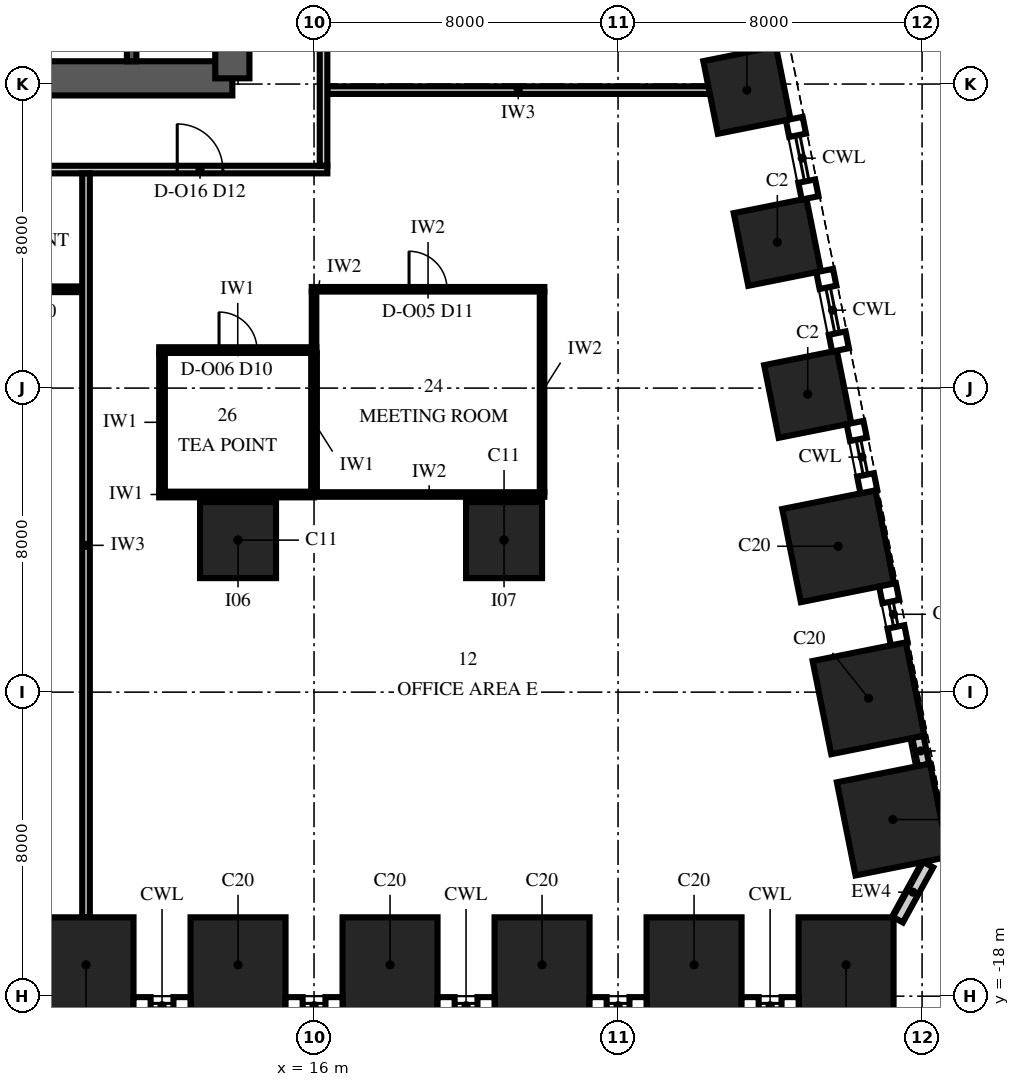
"""IFC4 building model, lengths in metres.
Left out: names, types, materials, properties, quantities, classifications, styles, units other than length and angle.
Written with IfcOpenShell. Run it as: python <this file> out.ifc"""

import sys

from ifc_helpers import new_model, si_unit, direction, frame, frame_2d, origin, origin_2d, place, context, subcontext, project, spatial, polyline, rectangle, outline, extrude, element, fill, save


model = new_model("IFC4")
c1 = context("Model", 3, precision=1e-05, world=origin(), true_north=direction((0.0, 1.0)))
c2 = subcontext(c1, "Body", "Model", "MODEL_VIEW")
j1 = project(units=[si_unit("LENGTHUNIT", "METRE"), si_unit("PLANEANGLEUNIT", "RADIAN")], contexts=[c1])
p1 = place(None, origin())
s1 = spatial("IfcSite", under=j1, at=p1, CompositionType="ELEMENT")
p2 = place(p1, origin())
s2 = spatial("IfcBuilding", under=s1, at=p2, CompositionType="ELEMENT")
p3 = place(p2, frame((0.0, 0.0, 36.0)))
s3 = spatial("IfcBuildingStorey", under=s2, at=p3, CompositionType="ELEMENT", Elevation=36.0)
for number, where, z_axis, x_axis in (
    (1, (10.0, -17.175, 0.0), (0.0, 0.0, 1.0), (1.0, 0.0, 0.0)),
    (2, (14.0, -17.175, 0.0), (0.0, 0.0, 1.0), (1.0, 0.0, 0.0)),
    (3, (18.0, -17.175, 0.0), (0.0, 0.0, 1.0), (1.0, 0.0, 0.0)),
    (4, (22.0, -17.175, 0.0), (0.0, 0.0, 1.0), (1.0, 0.0, 0.0)),
    (5, (26.0, -17.175, 0.0), (0.0, 0.0, 1.0), (1.0, 0.0, 0.0)),
    (6, (30.0, -17.175, 0.0), (0.0, 0.0, 1.0), (1.0, 0.0, 0.0)),
    (7, (31.229, -13.353, 0.0), (0.0, 0.0, 1.0), (-0.196, 0.981, 0.0)),
    (8, (30.591, -10.162, 0.0), (0.0, 0.0, 1.0), (-0.196, 0.981, 0.0)),
    (9, (29.791, -6.162, 0.0), (0.0, 0.0, 1.0), (-0.196, 0.981, 0.0)),
):
    element("IfcColumn", number, at=place(p3, frame(where, z_axis=z_axis, x_axis=x_axis)), inside=s3, PredefinedType="COLUMN", context=c2, shape_type="SweptSolid", body=[
        extrude(rectangle(XDim=2.5, YDim=2.5, at=origin_2d()), origin(), (0.0, 0.0, 1.0), 4.0),
    ])
for number, where, z_axis, x_axis in (
    (10, (28.991, -2.162, 0.0), (0.0, 0.0, 1.0), (-0.196, 0.981, 0.0)),
    (11, (28.191, 1.838, 0.0), (0.0, 0.0, 1.0), (-0.196, 0.981, 0.0)),
    (12, (27.391, 5.838, 0.0), (0.0, 0.0, 1.0), (-0.196, 0.981, 0.0)),
):
    element("IfcColumn", number, at=place(p3, frame(where, z_axis=z_axis, x_axis=x_axis)), inside=s3, PredefinedType="COLUMN", context=c2, shape_type="SweptSolid", body=[
        extrude(rectangle(XDim=1.95, YDim=1.95, at=origin_2d()), origin(), (0.0, 0.0, 1.0), 4.0),
    ])
for number, where, z_axis, x_axis in (
    (13, (14.0, -6.0, 0.0), (0.0, 0.0, 1.0), (1.0, 0.0, 0.0)),
    (14, (21.0, -6.0, 0.0), (0.0, 0.0, 1.0), (1.0, 0.0, 0.0)),
):
    element("IfcColumn", number, at=place(p3, frame(where, z_axis=z_axis, x_axis=x_axis)), inside=s3, PredefinedType="COLUMN", context=c2, shape_type="SweptSolid", body=[
        extrude(rectangle(XDim=2.0, YDim=2.0, at=origin_2d()), origin(), (0.0, 0.0, 1.0), 4.0),
    ])
p4 = place(p3, frame((-13.85, 6.15, 0.0), z_axis=(0.0, 0.0, 1.0), x_axis=(1.0, 0.0, 0.0)))
e15 = element("IfcWall", 15, at=p4, inside=s3, PredefinedType="SHEAR", context=c2, shape_type="SweptSolid", body=[
    extrude(rectangle(XDim=27.7, YDim=0.9, at=frame_2d((13.85, 0.0))), origin(), (0.0, 0.0, 1.0), 4.0),
])
p5 = place(p3, frame((13.85, 6.15, 0.0), z_axis=(0.0, 0.0, 1.0), x_axis=(0.0, 1.0, 0.0)))
e16 = element("IfcWall", 16, at=p5, inside=s3, PredefinedType="SHEAR", context=c2, shape_type="SweptSolid", body=[
    extrude(outline(polyline([(0.0, -0.45), (17.7, -0.45), (17.7, 0.0), (17.25, 0.0), (17.25, 0.45), (0.45, 0.45), (0.45, 0.0), (0.0, 0.0), (0.0, -0.45)])), origin(), (0.0, 0.0, 1.0), 4.0),
])
p6 = place(p5, frame((4.15, 0.0, 0.0)))
e17 = element("IfcOpeningElement", 17, at=p6, cuts=e16, PredefinedType="OPENING", context=c2, shape_type="SweptSolid", body=[
    extrude(rectangle(XDim=1.8, YDim=2.4, at=frame_2d((0.9, 1.2))), frame((0.0, 0.465, 0.0), z_axis=(0.0, -1.0, 0.0), x_axis=(1.0, 0.0, 0.0)), (0.0, 0.0, 1.0), 0.93),
])
p7 = place(p3, frame((11.2, 6.6, 0.0), z_axis=(0.0, 0.0, 1.0), x_axis=(0.0, 1.0, 0.0)))
e18 = element("IfcWall", 18, at=p7, inside=s3, PredefinedType="SHEAR", context=c2, shape_type="SweptSolid", body=[
    extrude(rectangle(XDim=2.675, YDim=0.25, at=frame_2d((1.337, 0.0))), origin(), (0.0, 0.0, 1.0), 4.0),
])
p8 = place(p3, frame((31.363, -15.988, 0.0), z_axis=(0.0, 0.0, 1.0), x_axis=(0.481879089964, 0.876237720402, 0.0)))
e19 = element("IfcWall", 19, at=p8, inside=s3, PredefinedType="SOLIDWALL", context=c2, shape_type="SweptSolid", body=[
    extrude(rectangle(XDim=1.654, YDim=0.3, at=frame_2d((0.827, 0.0))), origin(), (0.0, 0.0, 1.0), 4.0),
])
p9 = place(p3, frame((32.038, -11.916, 0.0), z_axis=(0.0, 0.0, 1.0), x_axis=(-0.195867092459, 0.980630451338, 0.0)))
e20 = element("IfcWall", 20, at=p9, inside=s3, PredefinedType="SOLIDWALL", context=c2, shape_type="SweptSolid", body=[
    extrude(rectangle(XDim=0.754, YDim=0.3, at=frame_2d((0.377, 0.0))), origin(), (0.0, 0.0, 1.0), 4.0),
])
p10 = place(p3, frame((11.925, -4.8, 0.0), z_axis=(0.0, 0.0, 1.0), x_axis=(1.0, 0.0, 0.0)))
e21 = element("IfcWall", 21, at=p10, inside=s3, PredefinedType="PARTITIONING", context=c2, shape_type="SweptSolid", body=[
    extrude(rectangle(XDim=4.075, YDim=0.15, at=frame_2d((2.038, 0.0))), origin(), (0.0, 0.0, 1.0), 3.25),
])
p11 = place(p3, frame((16.0, -4.8, 0.0), z_axis=(0.0, 0.0, 1.0), x_axis=(1.0, 0.0, 0.0)))
e22 = element("IfcWall", 22, at=p11, inside=s3, PredefinedType="PARTITIONING", context=c2, shape_type="SweptSolid", body=[
    extrude(rectangle(XDim=6.06, YDim=0.12, at=frame_2d((3.03, 0.0))), origin(), (0.0, 0.0, 1.0), 3.25),
])
p12 = place(p3, frame((11.925, -1.0, 0.0), z_axis=(0.0, 0.0, 1.0), x_axis=(1.0, 0.0, 0.0)))
e23 = element("IfcWall", 23, at=p12, inside=s3, PredefinedType="PARTITIONING", context=c2, shape_type="SweptSolid", body=[
    extrude(rectangle(XDim=4.135, YDim=0.15, at=frame_2d((2.067, 0.0))), origin(), (0.0, 0.0, 1.0), 3.25),
])
p13 = place(p12, frame((1.575, 0.0, 0.0)))
e24 = element("IfcOpeningElement", 24, at=p13, cuts=e23, PredefinedType="OPENING", context=c2, shape_type="SweptSolid", body=[
    extrude(rectangle(XDim=1.0, YDim=2.3, at=frame_2d((0.5, 1.15))), frame((0.0, 0.09, 0.0), z_axis=(0.0, -1.0, 0.0), x_axis=(1.0, 0.0, 0.0)), (0.0, 0.0, 1.0), 0.18),
])
p14 = place(p3, frame((5.925, 0.6, 0.0), z_axis=(0.0, 0.0, 1.0), x_axis=(1.0, 0.0, 0.0)))
e25 = element("IfcWall", 25, at=p14, inside=s3, PredefinedType="PARTITIONING", context=c2, shape_type="SweptSolid", body=[
    extrude(rectangle(XDim=3.975, YDim=0.15, at=frame_2d((1.987, 0.0))), origin(), (0.0, 0.0, 1.0), 3.85),
])
p15 = place(p14, frame((1.575, 0.0, 0.0)))
e26 = element("IfcOpeningElement", 26, at=p15, cuts=e25, PredefinedType="OPENING", context=c2, shape_type="SweptSolid", body=[
    extrude(rectangle(XDim=1.0, YDim=2.3, at=frame_2d((0.5, 1.15))), frame((0.0, 0.09, 0.0), z_axis=(0.0, -1.0, 0.0), x_axis=(1.0, 0.0, 0.0)), (0.0, 0.0, 1.0), 0.18),
])
p16 = place(p3, frame((15.94, 0.6, 0.0), z_axis=(0.0, 0.0, 1.0), x_axis=(1.0, 0.0, 0.0)))
e27 = element("IfcWall", 27, at=p16, inside=s3, PredefinedType="PARTITIONING", context=c2, shape_type="SweptSolid", body=[
    extrude(rectangle(XDim=6.12, YDim=0.12, at=frame_2d((3.06, 0.0))), origin(), (0.0, 0.0, 1.0), 3.25),
])
p17 = place(p16, frame((2.56, 0.0, 0.0)))
e28 = element("IfcOpeningElement", 28, at=p17, cuts=e27, PredefinedType="OPENING", context=c2, shape_type="SweptSolid", body=[
    extrude(rectangle(XDim=1.0, YDim=2.4, at=frame_2d((0.5, 1.2))), frame((0.0, 0.075, 0.0), z_axis=(0.0, -1.0, 0.0), x_axis=(1.0, 0.0, 0.0)), (0.0, 0.0, 1.0), 0.15),
])
p18 = place(p3, frame((-16.35, 3.75, 0.0), z_axis=(0.0, 0.0, 1.0), x_axis=(1.0, 0.0, 0.0)))
e29 = element("IfcWall", 29, at=p18, inside=s3, PredefinedType="PARTITIONING", context=c2, shape_type="SweptSolid", body=[
    extrude(rectangle(XDim=32.7, YDim=0.2, at=frame_2d((16.35, 0.0))), origin(), (0.0, 0.0, 1.0), 3.25),
])
p19 = place(p18, frame((15.75, 0.0, 0.0)))
e30 = element("IfcOpeningElement", 30, at=p19, cuts=e29, PredefinedType="OPENING", context=c2, shape_type="SweptSolid", body=[
    extrude(rectangle(XDim=1.2, YDim=2.4, at=frame_2d((0.6, 1.2))), frame((0.0, 0.115, 0.0), z_axis=(0.0, -1.0, 0.0), x_axis=(1.0, 0.0, 0.0)), (0.0, 0.0, 1.0), 0.23),
])
p20 = place(p18, frame((2.75, 0.0, 0.0)))
e31 = element("IfcOpeningElement", 31, at=p20, cuts=e29, PredefinedType="OPENING", context=c2, shape_type="SweptSolid", body=[
    extrude(rectangle(XDim=1.2, YDim=2.4, at=frame_2d((0.6, 1.2))), frame((0.0, 0.115, 0.0), z_axis=(0.0, -1.0, 0.0), x_axis=(1.0, 0.0, 0.0)), (0.0, 0.0, 1.0), 0.23),
])
p21 = place(p18, frame((28.75, 0.0, 0.0)))
e32 = element("IfcOpeningElement", 32, at=p21, cuts=e29, PredefinedType="OPENING", context=c2, shape_type="SweptSolid", body=[
    extrude(rectangle(XDim=1.2, YDim=2.4, at=frame_2d((0.6, 1.2))), frame((0.0, 0.115, 0.0), z_axis=(0.0, -1.0, 0.0), x_axis=(1.0, 0.0, 0.0)), (0.0, 0.0, 1.0), 0.23),
])
p22 = place(p3, frame((16.35, 5.84, 0.0), z_axis=(0.0, 0.0, 1.0), x_axis=(1.0, 0.0, 0.0)))
e33 = element("IfcWall", 33, at=p22, inside=s3, PredefinedType="PARTITIONING", context=c2, shape_type="SweptSolid", body=[
    extrude(rectangle(XDim=10.046, YDim=0.2, at=frame_2d((5.023, 0.0))), origin(), (0.0, 0.0, 1.0), 2.842),
])
p23 = place(p3, frame((10.0, -15.925, 0.0), z_axis=(0.0, 0.0, 1.0), x_axis=(0.0, 1.0, 0.0)))
e34 = element("IfcWall", 34, at=p23, inside=s3, PredefinedType="PARTITIONING", context=c2, shape_type="SweptSolid", body=[
    extrude(rectangle(XDim=19.575, YDim=0.2, at=frame_2d((9.788, 0.0))), origin(), (0.0, 0.0, 1.0), 2.842),
])
for number, where, z_axis, x_axis in (
    (35, (12.0, -4.725, 0.0), (0.0, 0.0, 1.0), (0.0, 1.0, 0.0)),
    (36, (16.0, -4.725, 0.0), (0.0, 0.0, 1.0), (0.0, 1.0, 0.0)),
):
    element("IfcWall", number, at=place(p3, frame(where, z_axis=z_axis, x_axis=x_axis)), inside=s3, PredefinedType="PARTITIONING", context=c2, shape_type="SweptSolid", body=[
        extrude(rectangle(XDim=3.65, YDim=0.15, at=frame_2d((1.825, 0.0))), origin(), (0.0, 0.0, 1.0), 3.85),
    ])
p24 = place(p3, frame((16.0, -0.925, 0.0), z_axis=(0.0, 0.0, 1.0), x_axis=(0.0, 1.0, 0.0)))
e37 = element("IfcWall", 37, at=p24, inside=s3, PredefinedType="PARTITIONING", context=c2, shape_type="SweptSolid", body=[
    extrude(rectangle(XDim=1.465, YDim=0.12, at=frame_2d((0.732, 0.0))), origin(), (0.0, 0.0, 1.0), 3.85),
])
p25 = place(p3, frame((16.25, 3.85, 0.0), z_axis=(0.0, 0.0, 1.0), x_axis=(0.0, 1.0, 0.0)))
e38 = element("IfcWall", 38, at=p25, inside=s3, PredefinedType="PARTITIONING", context=c2, shape_type="SweptSolid", body=[
    extrude(rectangle(XDim=22.3, YDim=0.2, at=frame_2d((11.15, 0.0))), origin(), (0.0, 0.0, 1.0), 2.842),
])
p26 = place(p25, frame((4.55, 0.0, 0.0)))
e39 = element("IfcOpeningElement", 39, at=p26, cuts=e38, PredefinedType="OPENING", context=c2, shape_type="SweptSolid", body=[
    extrude(rectangle(XDim=1.2, YDim=2.4, at=frame_2d((0.6, 1.2))), frame((0.0, 0.115, 0.0), z_axis=(0.0, -1.0, 0.0), x_axis=(1.0, 0.0, 0.0)), (0.0, 0.0, 1.0), 0.23),
])
p27 = place(p3, frame((22.0, -4.74, 0.0), z_axis=(0.0, 0.0, 1.0), x_axis=(0.0, 1.0, 0.0)))
e40 = element("IfcWall", 40, at=p27, inside=s3, PredefinedType="PARTITIONING", context=c2, shape_type="SweptSolid", body=[
    extrude(rectangle(XDim=5.28, YDim=0.12, at=frame_2d((2.64, 0.0))), origin(), (0.0, 0.0, 1.0), 3.25),
])
p28 = place(p17, origin())
e41 = element("IfcDoor", 41, at=p28, inside=s3, OperationType="SINGLE_SWING_RIGHT", PredefinedType="DOOR", context=c2, shape_type="SweptSolid", body=[
    extrude(rectangle(XDim=1.0, YDim=2.4, at=frame_2d((0.5, 1.2))), frame((0.0, 0.06, 0.0), z_axis=(0.0, -1.0, 0.0), x_axis=(1.0, 0.0, 0.0)), (0.0, 0.0, 1.0), 0.12),
])
fill(e28, e41)
p29 = place(p13, origin())
e42 = element("IfcDoor", 42, at=p29, inside=s3, OperationType="SINGLE_SWING_LEFT", PredefinedType="DOOR", context=c2, shape_type="SweptSolid", body=[
    extrude(rectangle(XDim=1.0, YDim=2.3, at=frame_2d((0.5, 1.15))), frame((0.0, 0.075, 0.0), z_axis=(0.0, -1.0, 0.0), x_axis=(1.0, 0.0, 0.0)), (0.0, 0.0, 1.0), 0.149),
])
fill(e24, e42)
p30 = place(p21, origin())
e43 = element("IfcDoor", 43, at=p30, inside=s3, OperationType="SINGLE_SWING_LEFT", PredefinedType="DOOR", context=c2, shape_type="SweptSolid", body=[
    extrude(rectangle(XDim=1.2, YDim=2.4, at=frame_2d((0.6, 1.2))), frame((0.0, 0.1, 0.0), z_axis=(0.0, -1.0, 0.0), x_axis=(1.0, 0.0, 0.0)), (0.0, 0.0, 1.0), 0.199),
])
fill(e32, e43)
save(model, sys.argv[1])
